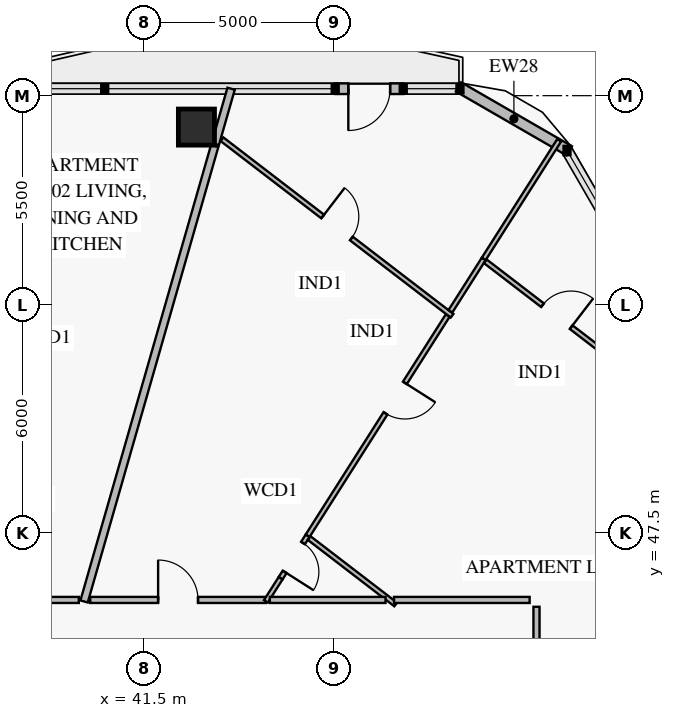
"""IFC4 building model, lengths in metres.
Left out: names, types, materials, properties, quantities, classifications, styles, units other than length and angle.
Written with IfcOpenShell. Run it as: python <this file> out.ifc"""

import sys

from ifc_helpers import new_model, si_unit, direction, frame, frame_2d, origin, origin_2d, place, context, subcontext, project, spatial, rectangle, extrude, element, fill, save


model = new_model("IFC4")
c1 = context("Model", 3, precision=1e-05, world=origin(), true_north=direction((0.0, 1.0)))
c2 = subcontext(c1, "Body", "Model", "MODEL_VIEW")
j1 = project(units=[si_unit("LENGTHUNIT", "METRE"), si_unit("PLANEANGLEUNIT", "RADIAN")], contexts=[c1])
p1 = place(None, origin())
s1 = spatial("IfcSite", under=j1, at=p1, CompositionType="ELEMENT")
p2 = place(p1, origin())
s2 = spatial("IfcBuilding", under=s1, at=p2, CompositionType="ELEMENT")
p3 = place(p2, frame((0.0, 0.0, 196.0)))
s3 = spatial("IfcBuildingStorey", under=s2, at=p3, CompositionType="ELEMENT", Elevation=196.0)
p4 = place(p3, frame((42.882, 58.173, 0.0), z_axis=(0.0, 0.0, 1.0), x_axis=(-1.0, 0.0, 0.0)))
e1 = element("IfcColumn", 1, at=p4, inside=s3, PredefinedType="COLUMN", context=c2, shape_type="SweptSolid", body=[
    extrude(rectangle(XDim=0.95, YDim=0.95, at=origin_2d()), origin(), (0.0, 0.0, 1.0), 3.55),
])
p5 = place(p3, frame((46.534, 59.183, 0.0), z_axis=(0.0, 0.0, 1.0), x_axis=(1.0, 0.0, 0.0)))
e2 = element("IfcWall", 2, at=p5, inside=s3, PredefinedType="SOLIDWALL", context=c2, shape_type="SweptSolid", body=[
    extrude(rectangle(XDim=1.79, YDim=0.28, at=frame_2d((0.895, 0.0))), origin(), (0.0, 0.0, 1.0), 3.55),
])
p6 = place(p5, frame((0.345, 0.0, 0.0)))
e3 = element("IfcOpeningElement", 3, at=p6, cuts=e2, PredefinedType="OPENING", context=c2, shape_type="SweptSolid", body=[
    extrude(rectangle(XDim=1.1, YDim=2.2, at=frame_2d((0.55, 1.1))), frame((0.0, 0.152, 0.0), z_axis=(0.0, -1.0, 0.0), x_axis=(1.0, 0.0, 0.0)), (0.0, 0.0, 1.0), 0.304),
])
p7 = place(p3, frame((49.779, 59.231, 0.0), z_axis=(0.0, 0.0, 1.0), x_axis=(0.866020068361, -0.500009241111, 0.0)))
e4 = element("IfcWall", 4, at=p7, inside=s3, PredefinedType="SOLIDWALL", context=c2, shape_type="SweptSolid", body=[
    extrude(rectangle(XDim=3.365, YDim=0.28, at=frame_2d((1.683, 0.0))), origin(), (0.0, 0.0, 1.0), 3.55),
])
p8 = place(p3, frame((49.609, 53.208, 0.0), z_axis=(0.0, 0.0, 1.0), x_axis=(-0.793348849006, 0.608767282121, 0.0)))
e5 = element("IfcWall", 5, at=p8, inside=s3, PredefinedType="PARTITIONING", context=c2, shape_type="SweptSolid", body=[
    extrude(rectangle(XDim=7.632, YDim=0.12, at=frame_2d((3.816, 0.0))), origin(), (0.0, 0.0, 1.0), 2.87),
])
p9 = place(p8, frame((3.341, 0.0, 0.0)))
e6 = element("IfcOpeningElement", 6, at=p9, cuts=e5, PredefinedType="OPENING", context=c2, shape_type="SweptSolid", body=[
    extrude(rectangle(XDim=0.95, YDim=2.1, at=frame_2d((0.475, 1.05))), frame((0.0, 0.072, 0.0), z_axis=(0.0, -1.0, 0.0), x_axis=(1.0, 0.0, 0.0)), (0.0, 0.0, 1.0), 0.144),
])
p10 = place(p3, frame((45.096, 46.3, 0.0), z_axis=(0.0, 0.0, 1.0), x_axis=(0.53661359275, 0.843828093913, 0.0)))
e7 = element("IfcWall", 7, at=p10, inside=s3, PredefinedType="PARTITIONING", context=c2, shape_type="SweptSolid", body=[
    extrude(rectangle(XDim=1.327, YDim=0.12, at=frame_2d((0.664, 0.0))), origin(), (0.0, 0.0, 1.0), 3.55),
])
p11 = place(p10, frame((0.2, 0.0, 0.0)))
e8 = element("IfcOpeningElement", 8, at=p11, cuts=e7, PredefinedType="OPENING", context=c2, shape_type="SweptSolid", body=[
    extrude(rectangle(XDim=0.9, YDim=2.1, at=frame_2d((0.45, 1.05))), frame((0.0, 0.072, 0.0), z_axis=(0.0, -1.0, 0.0), x_axis=(1.0, 0.0, 0.0)), (0.0, 0.0, 1.0), 0.144),
])
p12 = place(p3, frame((45.808, 47.42, 0.0), z_axis=(0.0, 0.0, 1.0), x_axis=(0.536718974009, 0.843761069817, 0.0)))
e9 = element("IfcWall", 9, at=p12, inside=s3, PredefinedType="PARTITIONING", context=c2, shape_type="SweptSolid", body=[
    extrude(rectangle(XDim=6.864, YDim=0.12, at=frame_2d((3.432, 0.0))), origin(), (0.0, 0.0, 1.0), 3.55),
])
p13 = place(p12, frame((3.817, 0.0, 0.0)))
e10 = element("IfcOpeningElement", 10, at=p13, cuts=e9, PredefinedType="OPENING", context=c2, shape_type="SweptSolid", body=[
    extrude(rectangle(XDim=0.95, YDim=2.1, at=frame_2d((0.475, 1.05))), frame((0.0, 0.072, 0.0), z_axis=(0.0, -1.0, 0.0), x_axis=(1.0, 0.0, 0.0)), (0.0, 0.0, 1.0), 0.144),
])
p14 = place(p3, frame((49.566, 53.326, 0.0), z_axis=(0.0, 0.0, 1.0), x_axis=(0.53659490955, 0.843839974785, 0.0)))
e11 = element("IfcWall", 11, at=p14, inside=s3, PredefinedType="PARTITIONING", context=c2, shape_type="SweptSolid", body=[
    extrude(rectangle(XDim=1.633, YDim=0.12, at=frame_2d((0.816, 0.0))), origin(), (0.0, 0.0, 1.0), 2.87),
])
p15 = place(p3, frame((54.73, 51.382, 0.0), z_axis=(0.0, 0.0, 1.0), x_axis=(-0.793330324721, 0.60879142231, 0.0)))
e12 = element("IfcWall", 12, at=p15, inside=s3, PredefinedType="PARTITIONING", context=c2, shape_type="SweptSolid", body=[
    extrude(rectangle(XDim=5.354, YDim=0.12, at=frame_2d((2.677, 0.0))), origin(), (0.0, 0.0, 1.0), 2.87),
])
p16 = place(p15, frame((2.506, 0.0, 0.0)))
e13 = element("IfcOpeningElement", 13, at=p16, cuts=e12, PredefinedType="OPENING", context=c2, shape_type="SweptSolid", body=[
    extrude(rectangle(XDim=0.95, YDim=2.1, at=frame_2d((0.475, 1.05))), frame((0.0, 0.072, 0.0), z_axis=(0.0, -1.0, 0.0), x_axis=(1.0, 0.0, 0.0)), (0.0, 0.0, 1.0), 0.144),
])
p17 = place(p3, frame((44.71, 45.73, 0.0), z_axis=(0.0, 0.0, 1.0), x_axis=(-1.0, 0.0, 0.0)))
e14 = element("IfcWall", 14, at=p17, inside=s3, PredefinedType="PARTITIONING", context=c2, shape_type="SweptSolid", body=[
    extrude(rectangle(XDim=4.622, YDim=0.16, at=frame_2d((2.311, 0.0))), origin(), (0.0, 0.0, 1.0), 3.55),
])
p18 = place(p17, frame((1.786, 0.0, 0.0)))
e15 = element("IfcOpeningElement", 15, at=p18, cuts=e14, PredefinedType="OPENING", context=c2, shape_type="SweptSolid", body=[
    extrude(rectangle(XDim=1.05, YDim=2.15, at=frame_2d((0.525, 1.075))), frame((0.0, 0.092, 0.0), z_axis=(0.0, -1.0, 0.0), x_axis=(1.0, 0.0, 0.0)), (0.0, 0.0, 1.0), 0.184),
])
p19 = place(p3, frame((39.787, 45.73, 0.0), z_axis=(0.0, 0.0, 1.0), x_axis=(-1.0, 0.0, 0.0)))
e16 = element("IfcWall", 16, at=p19, inside=s3, PredefinedType="PARTITIONING", context=c2, shape_type="SweptSolid", body=[
    extrude(rectangle(XDim=3.148, YDim=0.16, at=frame_2d((1.574, 0.0))), origin(), (0.0, 0.0, 1.0), 2.9),
])
p20 = place(p19, frame((1.049, 0.0, 0.0)))
e17 = element("IfcOpeningElement", 17, at=p20, cuts=e16, PredefinedType="OPENING", context=c2, shape_type="SweptSolid", body=[
    extrude(rectangle(XDim=1.05, YDim=2.15, at=frame_2d((0.525, 1.075))), frame((0.0, 0.092, 0.0), z_axis=(0.0, -1.0, 0.0), x_axis=(1.0, 0.0, 0.0)), (0.0, 0.0, 1.0), 0.184),
])
p21 = place(p3, frame((49.04, 39.835, 0.0), z_axis=(0.0, 0.0, 1.0), x_axis=(0.857165332012, 0.515041351346, 0.0)))
e18 = element("IfcWall", 18, at=p21, inside=s3, PredefinedType="PARTITIONING", context=c2, shape_type="SweptSolid", body=[
    extrude(rectangle(XDim=11.974, YDim=0.2, at=frame_2d((5.987, 0.0))), origin(), (0.0, 0.0, 1.0), 2.87),
])
p22 = place(p3, frame((44.71, 45.693, 0.0), z_axis=(0.0, 0.0, 1.0), x_axis=(0.536809663503, 0.843703375108, 0.0)))
e19 = element("IfcWall", 19, at=p22, inside=s3, PredefinedType="PARTITIONING", context=c2, shape_type="SweptSolid", body=[
    extrude(rectangle(XDim=0.72, YDim=0.12, at=frame_2d((0.36, 0.0))), origin(), (0.0, 0.0, 1.0), 3.55),
])
p23 = place(p3, frame((50.442, 54.704, 0.0), z_axis=(0.0, 0.0, 1.0), x_axis=(0.536696164754, 0.84377557842, 0.0)))
e20 = element("IfcWall", 20, at=p23, inside=s3, PredefinedType="PARTITIONING", context=c2, shape_type="SweptSolid", body=[
    extrude(rectangle(XDim=3.7, YDim=0.12, at=frame_2d((1.85, 0.0))), origin(), (0.0, 0.0, 1.0), 3.55),
])
p24 = place(p3, frame((48.126, 45.61, 0.0), z_axis=(0.0, 0.0, 1.0), x_axis=(-0.793388621377, 0.608715447043, 0.0)))
e21 = element("IfcWall", 21, at=p24, inside=s3, PredefinedType="PARTITIONING", context=c2, shape_type="SweptSolid", body=[
    extrude(rectangle(XDim=2.87, YDim=0.12, at=frame_2d((1.435, 0.0))), origin(), (0.0, 0.0, 1.0), 3.55),
])
p25 = place(p3, frame((39.926, 45.69, 0.0), z_axis=(0.0, 0.0, 1.0), x_axis=(0.275636294404, 0.961262000293, 0.0)))
e22 = element("IfcWall", 22, at=p25, inside=s3, PredefinedType="PARTITIONING", context=c2, shape_type="SweptSolid", body=[
    extrude(rectangle(XDim=12.471, YDim=0.2, at=frame_2d((6.236, 0.0))), origin(), (0.0, 0.0, 1.0), 3.55),
])
p26 = place(p3, frame((43.377, 57.727, 0.0), z_axis=(0.0, 0.0, 1.0), x_axis=(0.275721302425, 0.961237620669, 0.0)))
e23 = element("IfcWall", 23, at=p26, inside=s3, PredefinedType="PARTITIONING", context=c2, shape_type="SweptSolid", body=[
    extrude(rectangle(XDim=1.515, YDim=0.2, at=frame_2d((0.758, 0.0))), origin(), (0.0, 0.0, 1.0), 2.87),
])
p27 = place(p3, frame((47.858, 45.73, 0.0), z_axis=(0.0, 0.0, 1.0), x_axis=(-1.0, 0.0, 0.0)))
e24 = element("IfcWall", 24, at=p27, inside=s3, PredefinedType="PARTITIONING", context=c2, shape_type="SweptSolid", body=[
    extrude(rectangle(XDim=3.044, YDim=0.16, at=frame_2d((1.522, 0.0))), origin(), (0.0, 0.0, 1.0), 3.55),
])
p28 = place(p3, frame((51.65, 45.73, 0.0), z_axis=(0.0, 0.0, 1.0), x_axis=(-1.0, 0.0, 0.0)))
e25 = element("IfcWall", 25, at=p28, inside=s3, PredefinedType="PARTITIONING", context=c2, shape_type="SweptSolid", body=[
    extrude(rectangle(XDim=3.569, YDim=0.16, at=frame_2d((1.784, 0.0))), origin(), (0.0, 0.0, 1.0), 2.9),
])
p29 = place(p3, frame((51.83, 42.854, 0.0), z_axis=(0.0, 0.0, 1.0), x_axis=(0.0, 1.0, 0.0)))
e26 = element("IfcWall", 26, at=p29, inside=s3, PredefinedType="PARTITIONING", context=c2, shape_type="SweptSolid", body=[
    extrude(rectangle(XDim=2.697, YDim=0.16, at=frame_2d((1.348, 0.0))), origin(), (0.0, 0.0, 1.0), 3.15),
])
p30 = place(p6, frame((1.1, 0.0, 0.0), z_axis=(0.0, 0.0, 1.0), x_axis=(-1.0, 0.0, 0.0)))
e27 = element("IfcDoor", 27, at=p30, inside=s3, OperationType="SINGLE_SWING_RIGHT", PredefinedType="DOOR", context=c2, shape_type="SweptSolid", body=[
    extrude(rectangle(XDim=1.1, YDim=2.2, at=frame_2d((0.55, 1.1))), frame((0.0, 0.025, 0.0), z_axis=(0.0, -1.0, 0.0), x_axis=(1.0, 0.0, 0.0)), (0.0, 0.0, 1.0), 0.05),
])
fill(e3, e27)
p31 = place(p9, frame((0.95, 0.0, 0.0), z_axis=(0.0, 0.0, 1.0), x_axis=(-1.0, 0.0, 0.0)))
e28 = element("IfcDoor", 28, at=p31, inside=s3, OperationType="SINGLE_SWING_LEFT", PredefinedType="DOOR", context=c2, shape_type="SweptSolid", body=[
    extrude(rectangle(XDim=0.95, YDim=2.1, at=frame_2d((0.475, 1.05))), frame((0.0, 0.025, 0.0), z_axis=(0.0, -1.0, 0.0), x_axis=(1.0, 0.0, 0.0)), (0.0, 0.0, 1.0), 0.05),
])
fill(e6, e28)
p32 = place(p11, frame((0.9, 0.0, 0.0), z_axis=(0.0, 0.0, 1.0), x_axis=(-1.0, 0.0, 0.0)))
e29 = element("IfcDoor", 29, at=p32, inside=s3, OperationType="SINGLE_SWING_RIGHT", PredefinedType="DOOR", context=c2, shape_type="SweptSolid", body=[
    extrude(rectangle(XDim=0.9, YDim=2.1, at=frame_2d((0.45, 1.05))), frame((0.0, 0.025, 0.0), z_axis=(0.0, -1.0, 0.0), x_axis=(1.0, 0.0, 0.0)), (0.0, 0.0, 1.0), 0.05),
])
fill(e8, e29)
p33 = place(p13, frame((0.95, 0.0, 0.0), z_axis=(0.0, 0.0, 1.0), x_axis=(-1.0, 0.0, 0.0)))
e30 = element("IfcDoor", 30, at=p33, inside=s3, OperationType="SINGLE_SWING_LEFT", PredefinedType="DOOR", context=c2, shape_type="SweptSolid", body=[
    extrude(rectangle(XDim=0.95, YDim=2.1, at=frame_2d((0.475, 1.05))), frame((0.0, 0.025, 0.0), z_axis=(0.0, -1.0, 0.0), x_axis=(1.0, 0.0, 0.0)), (0.0, 0.0, 1.0), 0.05),
])
fill(e10, e30)
p34 = place(p16, frame((0.95, 0.0, 0.0), z_axis=(0.0, 0.0, 1.0), x_axis=(-1.0, 0.0, 0.0)))
e31 = element("IfcDoor", 31, at=p34, inside=s3, OperationType="SINGLE_SWING_RIGHT", PredefinedType="DOOR", context=c2, shape_type="SweptSolid", body=[
    extrude(rectangle(XDim=0.95, YDim=2.1, at=frame_2d((0.475, 1.05))), frame((0.0, 0.025, 0.0), z_axis=(0.0, -1.0, 0.0), x_axis=(1.0, 0.0, 0.0)), (0.0, 0.0, 1.0), 0.05),
])
fill(e13, e31)
p35 = place(p18, frame((1.05, 0.0, 0.0), z_axis=(0.0, 0.0, 1.0), x_axis=(-1.0, 0.0, 0.0)))
e32 = element("IfcDoor", 32, at=p35, inside=s3, OperationType="SINGLE_SWING_LEFT", PredefinedType="DOOR", context=c2, shape_type="SweptSolid", body=[
    extrude(rectangle(XDim=1.05, YDim=2.15, at=frame_2d((0.525, 1.075))), frame((0.0, 0.025, 0.0), z_axis=(0.0, -1.0, 0.0), x_axis=(1.0, 0.0, 0.0)), (0.0, 0.0, 1.0), 0.05),
])
fill(e15, e32)
save(model, sys.argv[1])
